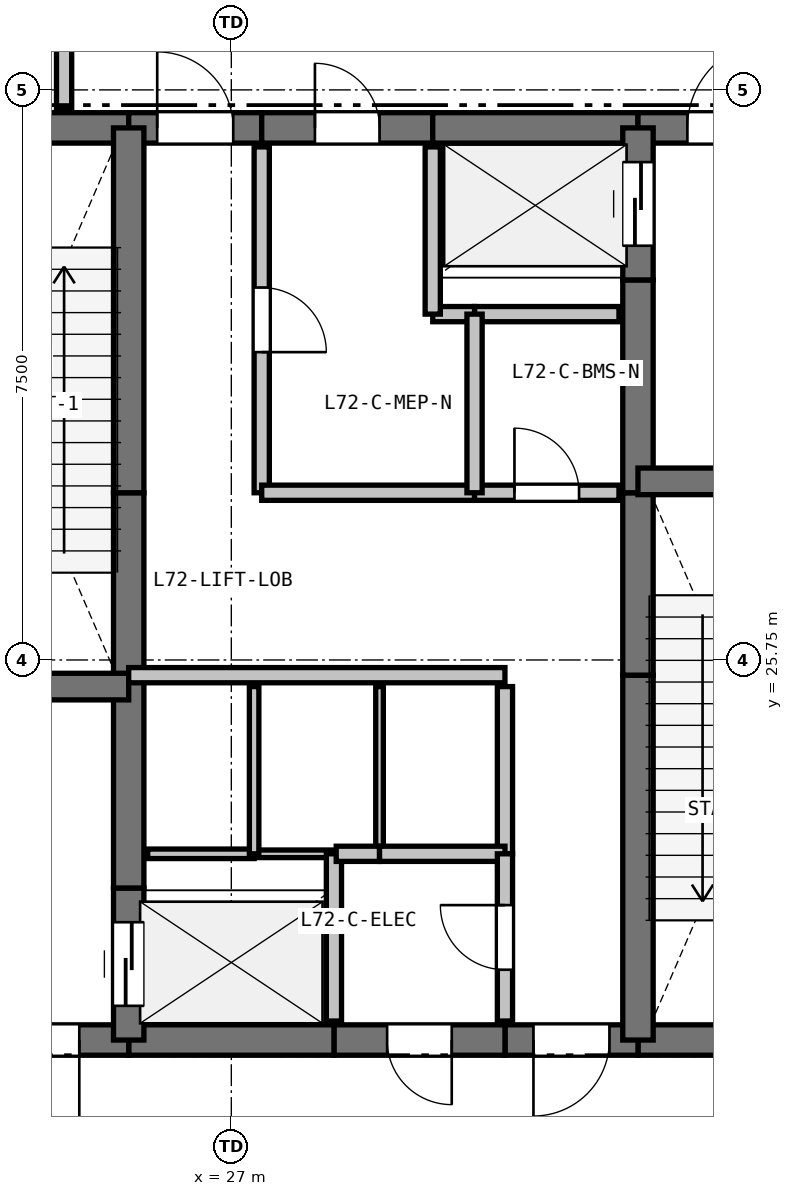
"""IFC4 building model, lengths in metres.
Left out: names, types, materials, properties, quantities, classifications, styles, units other than length and angle.
Written with IfcOpenShell. Run it as: python <this file> out.ifc"""

import sys

from ifc_helpers import new_model, si_unit, direction, frame, frame_2d, origin, place, context, subcontext, project, spatial, rectangle, extrude, element, fill, save


model = new_model("IFC4")
c1 = context("Model", 3, precision=1e-05, world=origin(), true_north=direction((0.0, 1.0)))
c2 = subcontext(c1, "Body", "Model", "MODEL_VIEW")
j1 = project(units=[si_unit("LENGTHUNIT", "METRE"), si_unit("PLANEANGLEUNIT", "RADIAN")], contexts=[c1])
p1 = place(None, origin())
s1 = spatial("IfcSite", under=j1, at=p1, CompositionType="ELEMENT")
p2 = place(p1, origin())
s2 = spatial("IfcBuilding", under=s1, at=p2, CompositionType="ELEMENT")
p3 = place(p2, frame((0.0, 0.0, 258.6)))
s3 = spatial("IfcBuildingStorey", under=s2, at=p3, CompositionType="ELEMENT", Elevation=258.6)
p4 = place(p3, frame((22.2, 32.75, 0.0), z_axis=(0.0, 0.0, 1.0), x_axis=(1.0, 0.0, 0.0)))
e1 = element("IfcWall", 1, at=p4, inside=s3, PredefinedType="SHEAR", context=c2, shape_type="SweptSolid", body=[
    extrude(rectangle(XDim=3.45, YDim=0.4, at=frame_2d((1.725, 0.0))), origin(), (0.0, 0.0, 1.0), 5.08),
])
p5 = place(p3, frame((25.65, 32.75, 0.0), z_axis=(0.0, 0.0, 1.0), x_axis=(1.0, 0.0, 0.0)))
e2 = element("IfcWall", 2, at=p5, inside=s3, PredefinedType="SHEAR", context=c2, shape_type="SweptSolid", body=[
    extrude(rectangle(XDim=1.75, YDim=0.4, at=frame_2d((0.875, 0.0))), origin(), (0.0, 0.0, 1.0), 5.08),
])
p6 = place(p5, frame((0.375, 0.0, 0.0)))
e3 = element("IfcOpeningElement", 3, at=p6, cuts=e2, PredefinedType="OPENING", context=c2, shape_type="SweptSolid", body=[
    extrude(rectangle(XDim=1.0, YDim=2.15, at=frame_2d((0.5, 1.075))), frame((0.0, 0.21, 0.0), z_axis=(0.0, -1.0, 0.0), x_axis=(1.0, 0.0, 0.0)), (0.0, 0.0, 1.0), 0.42),
])
p7 = place(p3, frame((27.4, 32.75, 0.0), z_axis=(0.0, 0.0, 1.0), x_axis=(1.0, 0.0, 0.0)))
e4 = element("IfcWall", 4, at=p7, inside=s3, PredefinedType="SHEAR", context=c2, shape_type="SweptSolid", body=[
    extrude(rectangle(XDim=2.25, YDim=0.4, at=frame_2d((1.125, 0.0))), origin(), (0.0, 0.0, 1.0), 5.08),
])
p8 = place(p7, frame((0.7, 0.0, 0.0)))
e5 = element("IfcOpeningElement", 5, at=p8, cuts=e4, PredefinedType="OPENING", context=c2, shape_type="SweptSolid", body=[
    extrude(rectangle(XDim=0.85, YDim=2.1, at=frame_2d((0.425, 1.05))), frame((0.0, 0.21, 0.0), z_axis=(0.0, -1.0, 0.0), x_axis=(1.0, 0.0, 0.0)), (0.0, 0.0, 1.0), 0.42),
])
p9 = place(p3, frame((29.65, 32.75, 0.0), z_axis=(0.0, 0.0, 1.0), x_axis=(1.0, 0.0, 0.0)))
e6 = element("IfcWall", 6, at=p9, inside=s3, PredefinedType="SHEAR", context=c2, shape_type="SweptSolid", body=[
    extrude(rectangle(XDim=2.7, YDim=0.4, at=frame_2d((1.35, 0.0))), origin(), (0.0, 0.0, 1.0), 5.08),
])
p10 = place(p3, frame((32.35, 32.75, 0.0), z_axis=(0.0, 0.0, 1.0), x_axis=(1.0, 0.0, 0.0)))
e7 = element("IfcWall", 7, at=p10, inside=s3, PredefinedType="SHEAR", context=c2, shape_type="SweptSolid", body=[
    extrude(rectangle(XDim=3.45, YDim=0.4, at=frame_2d((1.725, 0.0))), origin(), (0.0, 0.0, 1.0), 5.08),
])
p11 = place(p10, frame((0.65, 0.0, 0.0)))
e8 = element("IfcOpeningElement", 8, at=p11, cuts=e7, PredefinedType="OPENING", context=c2, shape_type="SweptSolid", body=[
    extrude(rectangle(XDim=1.15, YDim=2.15, at=frame_2d((0.575, 1.075))), frame((0.0, 0.21, 0.0), z_axis=(0.0, -1.0, 0.0), x_axis=(1.0, 0.0, 0.0)), (0.0, 0.0, 1.0), 0.42),
])
p12 = place(p3, frame((35.8, 20.75, 0.0), z_axis=(0.0, 0.0, 1.0), x_axis=(-1.0, 0.0, 0.0)))
e9 = element("IfcWall", 9, at=p12, inside=s3, PredefinedType="SHEAR", context=c2, shape_type="SweptSolid", body=[
    extrude(rectangle(XDim=3.45, YDim=0.4, at=frame_2d((1.725, 0.0))), origin(), (0.0, 0.0, 1.0), 5.08),
])
p13 = place(p3, frame((32.35, 20.75, 0.0), z_axis=(0.0, 0.0, 1.0), x_axis=(-1.0, 0.0, 0.0)))
e10 = element("IfcWall", 10, at=p13, inside=s3, PredefinedType="SHEAR", context=c2, shape_type="SweptSolid", body=[
    extrude(rectangle(XDim=1.75, YDim=0.4, at=frame_2d((0.875, 0.0))), origin(), (0.0, 0.0, 1.0), 5.08),
])
p14 = place(p13, frame((0.375, 0.0, 0.0)))
e11 = element("IfcOpeningElement", 11, at=p14, cuts=e10, PredefinedType="OPENING", context=c2, shape_type="SweptSolid", body=[
    extrude(rectangle(XDim=1.0, YDim=2.15, at=frame_2d((0.5, 1.075))), frame((0.0, 0.21, 0.0), z_axis=(0.0, -1.0, 0.0), x_axis=(1.0, 0.0, 0.0)), (0.0, 0.0, 1.0), 0.42),
])
p15 = place(p3, frame((30.6, 20.75, 0.0), z_axis=(0.0, 0.0, 1.0), x_axis=(-1.0, 0.0, 0.0)))
e12 = element("IfcWall", 12, at=p15, inside=s3, PredefinedType="SHEAR", context=c2, shape_type="SweptSolid", body=[
    extrude(rectangle(XDim=2.25, YDim=0.4, at=frame_2d((1.125, 0.0))), origin(), (0.0, 0.0, 1.0), 5.08),
])
p16 = place(p15, frame((0.7, 0.0, 0.0)))
e13 = element("IfcOpeningElement", 13, at=p16, cuts=e12, PredefinedType="OPENING", context=c2, shape_type="SweptSolid", body=[
    extrude(rectangle(XDim=0.85, YDim=2.1, at=frame_2d((0.425, 1.05))), frame((0.0, 0.21, 0.0), z_axis=(0.0, -1.0, 0.0), x_axis=(1.0, 0.0, 0.0)), (0.0, 0.0, 1.0), 0.42),
])
p17 = place(p3, frame((28.35, 20.75, 0.0), z_axis=(0.0, 0.0, 1.0), x_axis=(-1.0, 0.0, 0.0)))
e14 = element("IfcWall", 14, at=p17, inside=s3, PredefinedType="SHEAR", context=c2, shape_type="SweptSolid", body=[
    extrude(rectangle(XDim=2.7, YDim=0.4, at=frame_2d((1.35, 0.0))), origin(), (0.0, 0.0, 1.0), 5.08),
])
p18 = place(p3, frame((25.65, 20.75, 0.0), z_axis=(0.0, 0.0, 1.0), x_axis=(-1.0, 0.0, 0.0)))
e15 = element("IfcWall", 15, at=p18, inside=s3, PredefinedType="SHEAR", context=c2, shape_type="SweptSolid", body=[
    extrude(rectangle(XDim=3.45, YDim=0.4, at=frame_2d((1.725, 0.0))), origin(), (0.0, 0.0, 1.0), 5.08),
])
p19 = place(p18, frame((0.65, 0.0, 0.0)))
e16 = element("IfcOpeningElement", 16, at=p19, cuts=e15, PredefinedType="OPENING", context=c2, shape_type="SweptSolid", body=[
    extrude(rectangle(XDim=1.15, YDim=2.15, at=frame_2d((0.575, 1.075))), frame((0.0, 0.21, 0.0), z_axis=(0.0, -1.0, 0.0), x_axis=(1.0, 0.0, 0.0)), (0.0, 0.0, 1.0), 0.42),
])
p20 = place(p3, frame((25.65, 20.75, 0.0), z_axis=(0.0, 0.0, 1.0), x_axis=(0.0, 1.0, 0.0)))
e17 = element("IfcWall", 17, at=p20, inside=s3, PredefinedType="SHEAR", context=c2, shape_type="SweptSolid", body=[
    extrude(rectangle(XDim=2.0, YDim=0.4, at=frame_2d((1.0, 0.0))), origin(), (0.0, 0.0, 1.0), 5.08),
])
p21 = place(p20, frame((0.45, 0.0, 0.0)))
e18 = element("IfcOpeningElement", 18, at=p21, cuts=e17, PredefinedType="OPENING", context=c2, shape_type="SweptSolid", body=[
    extrude(rectangle(XDim=1.1, YDim=2.15, at=frame_2d((0.55, 1.075))), frame((0.0, 0.21, 0.0), z_axis=(0.0, -1.0, 0.0), x_axis=(1.0, 0.0, 0.0)), (0.0, 0.0, 1.0), 0.42),
])
p22 = place(p3, frame((25.65, 22.75, 0.0), z_axis=(0.0, 0.0, 1.0), x_axis=(0.0, 1.0, 0.0)))
e19 = element("IfcWall", 19, at=p22, inside=s3, PredefinedType="SHEAR", context=c2, shape_type="SweptSolid", body=[
    extrude(rectangle(XDim=2.8, YDim=0.4, at=frame_2d((1.4, 0.0))), origin(), (0.0, 0.0, 1.0), 5.08),
])
p23 = place(p3, frame((25.65, 25.55, 0.0), z_axis=(0.0, 0.0, 1.0), x_axis=(0.0, 1.0, 0.0)))
e20 = element("IfcWall", 20, at=p23, inside=s3, PredefinedType="SHEAR", context=c2, shape_type="SweptSolid", body=[
    extrude(rectangle(XDim=2.4, YDim=0.4, at=frame_2d((1.2, 0.0))), origin(), (0.0, 0.0, 1.0), 5.08),
])
for number, where, z_axis, x_axis in (
    (21, (25.65, 27.95, 0.0), (0.0, 0.0, 1.0), (0.0, 1.0, 0.0)),
    (22, (32.35, 20.75, 0.0), (0.0, 0.0, 1.0), (0.0, 1.0, 0.0)),
):
    element("IfcWall", number, at=place(p3, frame(where, z_axis=z_axis, x_axis=x_axis)), inside=s3, PredefinedType="SHEAR", context=c2, shape_type="SweptSolid", body=[
        extrude(rectangle(XDim=4.8, YDim=0.4, at=frame_2d((2.4, 0.0))), origin(), (0.0, 0.0, 1.0), 5.08),
    ])
p24 = place(p3, frame((32.35, 25.55, 0.0), z_axis=(0.0, 0.0, 1.0), x_axis=(0.0, 1.0, 0.0)))
e23 = element("IfcWall", 23, at=p24, inside=s3, PredefinedType="SHEAR", context=c2, shape_type="SweptSolid", body=[
    extrude(rectangle(XDim=2.4, YDim=0.4, at=frame_2d((1.2, 0.0))), origin(), (0.0, 0.0, 1.0), 5.08),
])
p25 = place(p3, frame((32.35, 27.95, 0.0), z_axis=(0.0, 0.0, 1.0), x_axis=(0.0, 1.0, 0.0)))
e24 = element("IfcWall", 24, at=p25, inside=s3, PredefinedType="SHEAR", context=c2, shape_type="SweptSolid", body=[
    extrude(rectangle(XDim=2.8, YDim=0.4, at=frame_2d((1.4, 0.0))), origin(), (0.0, 0.0, 1.0), 5.08),
])
p26 = place(p3, frame((32.35, 30.75, 0.0), z_axis=(0.0, 0.0, 1.0), x_axis=(0.0, 1.0, 0.0)))
e25 = element("IfcWall", 25, at=p26, inside=s3, PredefinedType="SHEAR", context=c2, shape_type="SweptSolid", body=[
    extrude(rectangle(XDim=2.0, YDim=0.4, at=frame_2d((1.0, 0.0))), origin(), (0.0, 0.0, 1.0), 5.08),
])
p27 = place(p26, frame((0.45, 0.0, 0.0)))
e26 = element("IfcOpeningElement", 26, at=p27, cuts=e25, PredefinedType="OPENING", context=c2, shape_type="SweptSolid", body=[
    extrude(rectangle(XDim=1.1, YDim=2.15, at=frame_2d((0.55, 1.075))), frame((0.0, 0.21, 0.0), z_axis=(0.0, -1.0, 0.0), x_axis=(1.0, 0.0, 0.0)), (0.0, 0.0, 1.0), 0.42),
])
p28 = place(p3, frame((22.2, 25.4, 0.0), z_axis=(0.0, 0.0, 1.0), x_axis=(1.0, 0.0, 0.0)))
e27 = element("IfcWall", 27, at=p28, inside=s3, PredefinedType="SHEAR", context=c2, shape_type="SweptSolid", body=[
    extrude(rectangle(XDim=3.45, YDim=0.35, at=frame_2d((1.725, 0.0))), origin(), (0.0, 0.0, 1.0), 5.08),
])
p29 = place(p28, frame((1.15, 0.0, 0.0)))
e28 = element("IfcOpeningElement", 28, at=p29, cuts=e27, PredefinedType="OPENING", context=c2, shape_type="SweptSolid", body=[
    extrude(rectangle(XDim=1.15, YDim=2.15, at=frame_2d((0.575, 1.075))), frame((0.0, 0.185, 0.0), z_axis=(0.0, -1.0, 0.0), x_axis=(1.0, 0.0, 0.0)), (0.0, 0.0, 1.0), 0.37),
])
p30 = place(p3, frame((32.35, 28.1, 0.0), z_axis=(0.0, 0.0, 1.0), x_axis=(1.0, 0.0, 0.0)))
e29 = element("IfcWall", 29, at=p30, inside=s3, PredefinedType="SHEAR", context=c2, shape_type="SweptSolid", body=[
    extrude(rectangle(XDim=3.45, YDim=0.35, at=frame_2d((1.725, 0.0))), origin(), (0.0, 0.0, 1.0), 5.08),
])
p31 = place(p30, frame((1.15, 0.0, 0.0)))
e30 = element("IfcOpeningElement", 30, at=p31, cuts=e29, PredefinedType="OPENING", context=c2, shape_type="SweptSolid", body=[
    extrude(rectangle(XDim=1.15, YDim=2.15, at=frame_2d((0.575, 1.075))), frame((0.0, 0.185, 0.0), z_axis=(0.0, -1.0, 0.0), x_axis=(1.0, 0.0, 0.0)), (0.0, 0.0, 1.0), 0.37),
])
p32 = place(p3, frame((25.65, 25.55, 0.0), z_axis=(0.0, 0.0, 1.0), x_axis=(1.0, 0.0, 0.0)))
e31 = element("IfcWall", 31, at=p32, inside=s3, PredefinedType="PARTITIONING", context=c2, shape_type="SweptSolid", body=[
    extrude(rectangle(XDim=4.95, YDim=0.2, at=frame_2d((2.475, 0.0))), origin(), (0.0, 0.0, 1.0), 5.08),
])
p33 = place(p3, frame((25.9, 23.2, 0.0), z_axis=(0.0, 0.0, 1.0), x_axis=(1.0, 0.0, 0.0)))
e32 = element("IfcWall", 32, at=p33, inside=s3, PredefinedType="PARTITIONING", context=c2, shape_type="SweptSolid", body=[
    extrude(rectangle(XDim=1.4, YDim=0.125, at=frame_2d((0.7, 0.0))), origin(), (0.0, 0.0, 1.0), 5.08),
])
p34 = place(p3, frame((27.3, 23.2, 0.0), z_axis=(0.0, 0.0, 1.0), x_axis=(1.0, 0.0, 0.0)))
e33 = element("IfcWall", 33, at=p34, inside=s3, PredefinedType="PARTITIONING", context=c2, shape_type="SweptSolid", body=[
    extrude(rectangle(XDim=1.05, YDim=0.1, at=frame_2d((0.525, 0.0))), origin(), (0.0, 0.0, 1.0), 5.08),
])
p35 = place(p3, frame((28.35, 23.2, 0.0), z_axis=(0.0, 0.0, 1.0), x_axis=(0.0, -1.0, 0.0)))
e34 = element("IfcWall", 34, at=p35, inside=s3, PredefinedType="PARTITIONING", context=c2, shape_type="SweptSolid", body=[
    extrude(rectangle(XDim=2.2, YDim=0.2, at=frame_2d((1.1, 0.0))), origin(), (0.0, 0.0, 1.0), 5.08),
])
p36 = place(p3, frame((32.1, 30.3, 0.0), z_axis=(0.0, 0.0, 1.0), x_axis=(-1.0, 0.0, 0.0)))
e35 = element("IfcWall", 35, at=p36, inside=s3, PredefinedType="PARTITIONING", context=c2, shape_type="SweptSolid", body=[
    extrude(rectangle(XDim=1.9, YDim=0.2, at=frame_2d((0.95, 0.0))), origin(), (0.0, 0.0, 1.0), 5.08),
])
p37 = place(p3, frame((30.2, 30.3, 0.0), z_axis=(0.0, 0.0, 1.0), x_axis=(-1.0, 0.0, 0.0)))
e36 = element("IfcWall", 36, at=p37, inside=s3, PredefinedType="PARTITIONING", context=c2, shape_type="SweptSolid", body=[
    extrude(rectangle(XDim=0.55, YDim=0.2, at=frame_2d((0.275, 0.0))), origin(), (0.0, 0.0, 1.0), 5.08),
])
p38 = place(p3, frame((29.65, 30.3, 0.0), z_axis=(0.0, 0.0, 1.0), x_axis=(0.0, 1.0, 0.0)))
e37 = element("IfcWall", 37, at=p38, inside=s3, PredefinedType="PARTITIONING", context=c2, shape_type="SweptSolid", body=[
    extrude(rectangle(XDim=2.2, YDim=0.2, at=frame_2d((1.1, 0.0))), origin(), (0.0, 0.0, 1.0), 5.08),
])
p39 = place(p3, frame((27.3, 25.4, 0.0), z_axis=(0.0, 0.0, 1.0), x_axis=(0.0, -1.0, 0.0)))
e38 = element("IfcWall", 38, at=p39, inside=s3, PredefinedType="PARTITIONING", context=c2, shape_type="SweptSolid", body=[
    extrude(rectangle(XDim=2.2, YDim=0.125, at=frame_2d((1.1, 0.0))), origin(), (0.0, 0.0, 1.0), 5.08),
])
p40 = place(p3, frame((28.95, 25.4, 0.0), z_axis=(0.0, 0.0, 1.0), x_axis=(0.0, -1.0, 0.0)))
e39 = element("IfcWall", 39, at=p40, inside=s3, PredefinedType="PARTITIONING", context=c2, shape_type="SweptSolid", body=[
    extrude(rectangle(XDim=2.2, YDim=0.1, at=frame_2d((1.1, 0.0))), origin(), (0.0, 0.0, 1.0), 5.08),
])
p41 = place(p3, frame((28.95, 23.2, 0.0), z_axis=(0.0, 0.0, 1.0), x_axis=(-1.0, 0.0, 0.0)))
e40 = element("IfcWall", 40, at=p41, inside=s3, PredefinedType="PARTITIONING", context=c2, shape_type="SweptSolid", body=[
    extrude(rectangle(XDim=0.57, YDim=0.2, at=frame_2d((0.285, 0.0))), origin(), (0.0, 0.0, 1.0), 5.08),
])
p42 = place(p3, frame((30.6, 25.4, 0.0), z_axis=(0.0, 0.0, 1.0), x_axis=(0.0, -1.0, 0.0)))
e41 = element("IfcWall", 41, at=p42, inside=s3, PredefinedType="PARTITIONING", context=c2, shape_type="SweptSolid", body=[
    extrude(rectangle(XDim=2.2, YDim=0.2, at=frame_2d((1.1, 0.0))), origin(), (0.0, 0.0, 1.0), 5.08),
])
p43 = place(p3, frame((30.6, 23.2, 0.0), z_axis=(0.0, 0.0, 1.0), x_axis=(-1.0, 0.0, 0.0)))
e42 = element("IfcWall", 42, at=p43, inside=s3, PredefinedType="PARTITIONING", context=c2, shape_type="SweptSolid", body=[
    extrude(rectangle(XDim=1.65, YDim=0.2, at=frame_2d((0.825, 0.0))), origin(), (0.0, 0.0, 1.0), 5.08),
])
p44 = place(p3, frame((30.6, 21.0, 0.0), z_axis=(0.0, 0.0, 1.0), x_axis=(0.0, 1.0, 0.0)))
e43 = element("IfcWall", 43, at=p44, inside=s3, PredefinedType="PARTITIONING", context=c2, shape_type="SweptSolid", body=[
    extrude(rectangle(XDim=2.2, YDim=0.2, at=frame_2d((1.1, 0.0))), origin(), (0.0, 0.0, 1.0), 5.08),
])
p45 = place(p44, frame((0.675, 0.0, 0.0)))
e44 = element("IfcOpeningElement", 44, at=p45, cuts=e43, PredefinedType="OPENING", context=c2, shape_type="SweptSolid", body=[
    extrude(rectangle(XDim=0.85, YDim=2.1, at=frame_2d((0.425, 1.05))), frame((0.0, 0.11, 0.0), z_axis=(0.0, -1.0, 0.0), x_axis=(1.0, 0.0, 0.0)), (0.0, 0.0, 1.0), 0.22),
])
p46 = place(p3, frame((27.4, 32.5, 0.0), z_axis=(0.0, 0.0, 1.0), x_axis=(0.0, -1.0, 0.0)))
e45 = element("IfcWall", 45, at=p46, inside=s3, PredefinedType="PARTITIONING", context=c2, shape_type="SweptSolid", body=[
    extrude(rectangle(XDim=4.55, YDim=0.2, at=frame_2d((2.275, 0.0))), origin(), (0.0, 0.0, 1.0), 5.08),
])
p47 = place(p46, frame((1.85, 0.0, 0.0)))
e46 = element("IfcOpeningElement", 46, at=p47, cuts=e45, PredefinedType="OPENING", context=c2, shape_type="SweptSolid", body=[
    extrude(rectangle(XDim=0.85, YDim=2.1, at=frame_2d((0.425, 1.05))), frame((0.0, 0.11, 0.0), z_axis=(0.0, -1.0, 0.0), x_axis=(1.0, 0.0, 0.0)), (0.0, 0.0, 1.0), 0.22),
])
p48 = place(p3, frame((27.4, 27.95, 0.0), z_axis=(0.0, 0.0, 1.0), x_axis=(1.0, 0.0, 0.0)))
e47 = element("IfcWall", 47, at=p48, inside=s3, PredefinedType="PARTITIONING", context=c2, shape_type="SweptSolid", body=[
    extrude(rectangle(XDim=2.8, YDim=0.2, at=frame_2d((1.4, 0.0))), origin(), (0.0, 0.0, 1.0), 5.08),
])
p49 = place(p3, frame((30.2, 27.95, 0.0), z_axis=(0.0, 0.0, 1.0), x_axis=(1.0, 0.0, 0.0)))
e48 = element("IfcWall", 48, at=p49, inside=s3, PredefinedType="PARTITIONING", context=c2, shape_type="SweptSolid", body=[
    extrude(rectangle(XDim=1.9, YDim=0.2, at=frame_2d((0.95, 0.0))), origin(), (0.0, 0.0, 1.0), 5.08),
])
p50 = place(p49, frame((0.525, 0.0, 0.0)))
e49 = element("IfcOpeningElement", 49, at=p50, cuts=e48, PredefinedType="OPENING", context=c2, shape_type="SweptSolid", body=[
    extrude(rectangle(XDim=0.85, YDim=2.1, at=frame_2d((0.425, 1.05))), frame((0.0, 0.11, 0.0), z_axis=(0.0, -1.0, 0.0), x_axis=(1.0, 0.0, 0.0)), (0.0, 0.0, 1.0), 0.22),
])
p51 = place(p3, frame((24.8, 33.0, 0.0), z_axis=(0.0, 0.0, 1.0), x_axis=(0.0, 1.0, 0.0)))
e50 = element("IfcWall", 50, at=p51, inside=s3, PredefinedType="PARTITIONING", context=c2, shape_type="SweptSolid", body=[
    extrude(rectangle(XDim=2.55, YDim=0.2, at=frame_2d((1.275, 0.0))), origin(), (0.0, 0.0, 1.0), 4.605),
])
p52 = place(p3, frame((30.2, 30.3, 0.0), z_axis=(0.0, 0.0, 1.0), x_axis=(0.0, -1.0, 0.0)))
e51 = element("IfcWall", 51, at=p52, inside=s3, PredefinedType="PARTITIONING", context=c2, shape_type="SweptSolid", body=[
    extrude(rectangle(XDim=2.35, YDim=0.2, at=frame_2d((1.175, 0.0))), origin(), (0.0, 0.0, 1.0), 5.08),
])
p53 = place(p6, origin())
e52 = element("IfcDoor", 52, at=p53, inside=s3, OperationType="SINGLE_SWING_LEFT", PredefinedType="DOOR", context=c2, shape_type="SweptSolid", body=[
    extrude(rectangle(XDim=1.0, YDim=2.15, at=frame_2d((0.5, 1.075))), frame((0.0, 0.025, 0.0), z_axis=(0.0, -1.0, 0.0), x_axis=(1.0, 0.0, 0.0)), (0.0, 0.0, 1.0), 0.05),
])
fill(e3, e52)
p54 = place(p14, origin())
e53 = element("IfcDoor", 53, at=p54, inside=s3, OperationType="SINGLE_SWING_RIGHT", PredefinedType="DOOR", context=c2, shape_type="SweptSolid", body=[
    extrude(rectangle(XDim=1.0, YDim=2.15, at=frame_2d((0.5, 1.075))), frame((0.0, 0.025, 0.0), z_axis=(0.0, -1.0, 0.0), x_axis=(1.0, 0.0, 0.0)), (0.0, 0.0, 1.0), 0.05),
])
fill(e11, e53)
p55 = place(p21, origin())
e54 = element("IfcDoor", 54, at=p55, inside=s3, OperationType="SLIDING_TO_LEFT", PredefinedType="DOOR", context=c2, shape_type="SweptSolid", body=[
    extrude(rectangle(XDim=1.1, YDim=2.15, at=frame_2d((0.55, 1.075))), frame((0.0, 0.025, 0.0), z_axis=(0.0, -1.0, 0.0), x_axis=(1.0, 0.0, 0.0)), (0.0, 0.0, 1.0), 0.05),
])
fill(e18, e54)
p56 = place(p27, origin())
e55 = element("IfcDoor", 55, at=p56, inside=s3, OperationType="SLIDING_TO_LEFT", PredefinedType="DOOR", context=c2, shape_type="SweptSolid", body=[
    extrude(rectangle(XDim=1.1, YDim=2.15, at=frame_2d((0.55, 1.075))), frame((0.0, 0.025, 0.0), z_axis=(0.0, -1.0, 0.0), x_axis=(1.0, 0.0, 0.0)), (0.0, 0.0, 1.0), 0.05),
])
fill(e26, e55)
p57 = place(p19, origin())
e56 = element("IfcDoor", 56, at=p57, inside=s3, OperationType="SINGLE_SWING_LEFT", PredefinedType="DOOR", context=c2, shape_type="SweptSolid", body=[
    extrude(rectangle(XDim=1.15, YDim=2.15, at=frame_2d((0.575, 1.075))), frame((0.0, 0.025, 0.0), z_axis=(0.0, -1.0, 0.0), x_axis=(1.0, 0.0, 0.0)), (0.0, 0.0, 1.0), 0.05),
])
fill(e16, e56)
p58 = place(p11, origin())
e57 = element("IfcDoor", 57, at=p58, inside=s3, OperationType="SINGLE_SWING_RIGHT", PredefinedType="DOOR", context=c2, shape_type="SweptSolid", body=[
    extrude(rectangle(XDim=1.15, YDim=2.15, at=frame_2d((0.575, 1.075))), frame((0.0, 0.025, 0.0), z_axis=(0.0, -1.0, 0.0), x_axis=(1.0, 0.0, 0.0)), (0.0, 0.0, 1.0), 0.05),
])
fill(e8, e57)
p59 = place(p47, origin())
e58 = element("IfcDoor", 58, at=p59, inside=s3, OperationType="SINGLE_SWING_RIGHT", PredefinedType="DOOR", context=c2, shape_type="SweptSolid", body=[
    extrude(rectangle(XDim=0.85, YDim=2.1, at=frame_2d((0.425, 1.05))), frame((0.0, 0.025, 0.0), z_axis=(0.0, -1.0, 0.0), x_axis=(1.0, 0.0, 0.0)), (0.0, 0.0, 1.0), 0.05),
])
fill(e46, e58)
p60 = place(p50, origin())
e59 = element("IfcDoor", 59, at=p60, inside=s3, OperationType="SINGLE_SWING_LEFT", PredefinedType="DOOR", context=c2, shape_type="SweptSolid", body=[
    extrude(rectangle(XDim=0.85, YDim=2.1, at=frame_2d((0.425, 1.05))), frame((0.0, 0.025, 0.0), z_axis=(0.0, -1.0, 0.0), x_axis=(1.0, 0.0, 0.0)), (0.0, 0.0, 1.0), 0.05),
])
fill(e49, e59)
p61 = place(p45, origin())
e60 = element("IfcDoor", 60, at=p61, inside=s3, OperationType="SINGLE_SWING_RIGHT", PredefinedType="DOOR", context=c2, shape_type="SweptSolid", body=[
    extrude(rectangle(XDim=0.85, YDim=2.1, at=frame_2d((0.425, 1.05))), frame((0.0, 0.025, 0.0), z_axis=(0.0, -1.0, 0.0), x_axis=(1.0, 0.0, 0.0)), (0.0, 0.0, 1.0), 0.05),
])
fill(e44, e60)
p62 = place(p8, origin())
e61 = element("IfcDoor", 61, at=p62, inside=s3, OperationType="SINGLE_SWING_LEFT", PredefinedType="DOOR", context=c2, shape_type="SweptSolid", body=[
    extrude(rectangle(XDim=0.85, YDim=2.1, at=frame_2d((0.425, 1.05))), frame((0.0, 0.025, 0.0), z_axis=(0.0, -1.0, 0.0), x_axis=(1.0, 0.0, 0.0)), (0.0, 0.0, 1.0), 0.05),
])
fill(e5, e61)
p63 = place(p16, origin())
e62 = element("IfcDoor", 62, at=p63, inside=s3, OperationType="SINGLE_SWING_LEFT", PredefinedType="DOOR", context=c2, shape_type="SweptSolid", body=[
    extrude(rectangle(XDim=0.85, YDim=2.1, at=frame_2d((0.425, 1.05))), frame((0.0, 0.025, 0.0), z_axis=(0.0, -1.0, 0.0), x_axis=(1.0, 0.0, 0.0)), (0.0, 0.0, 1.0), 0.05),
])
fill(e13, e62)
save(model, sys.argv[1])
